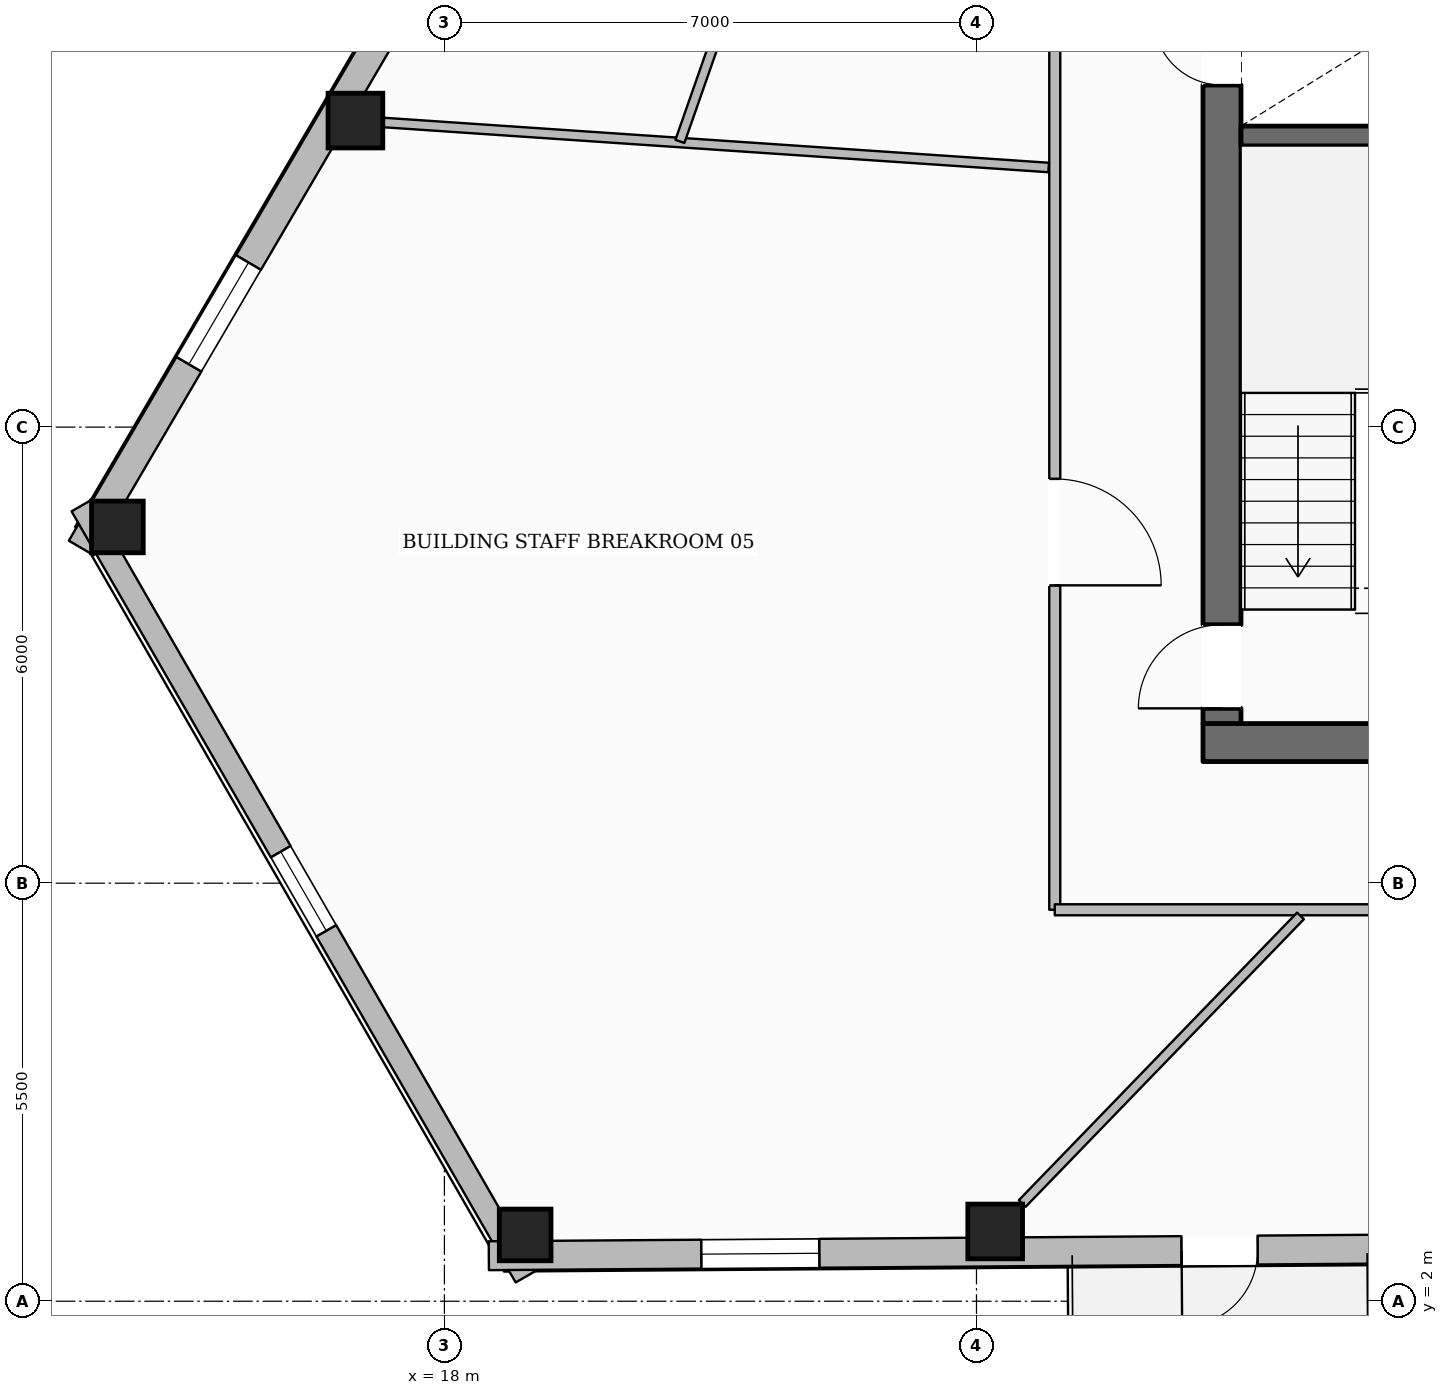
"""IFC4 building model, lengths in metres.
Left out: names, types, materials, properties, quantities, classifications, styles, units other than length and angle.
Written with IfcOpenShell. Run it as: python <this file> out.ifc"""

import sys

from ifc_helpers import new_model, si_unit, direction, frame, frame_2d, origin, origin_2d, place, context, subcontext, project, spatial, rectangle, hollow_rectangle, extrude, element, fill, save


model = new_model("IFC4")
c1 = context("Model", 3, precision=1e-05, world=origin(), true_north=direction((0.0, 1.0)))
c2 = subcontext(c1, "Body", "Model", "MODEL_VIEW")
j1 = project(units=[si_unit("LENGTHUNIT", "METRE"), si_unit("PLANEANGLEUNIT", "RADIAN")], contexts=[c1])
p1 = place(None, origin())
s1 = spatial("IfcSite", under=j1, at=p1, CompositionType="ELEMENT")
p2 = place(p1, origin())
s2 = spatial("IfcBuilding", under=s1, at=p2, CompositionType="ELEMENT")
p3 = place(p2, frame((0.0, 0.0, 143.25)))
s3 = spatial("IfcBuildingStorey", under=s2, at=p3, CompositionType="ELEMENT", Elevation=143.25)
p4 = place(p3, frame((27.98, 9.35, 0.0), z_axis=(0.0, 0.0, 1.0), x_axis=(1.0, 0.0, 0.0)))
e1 = element("IfcWall", 1, at=p4, inside=s3, PredefinedType="SOLIDWALL", context=c2, shape_type="SweptSolid", body=[
    extrude(rectangle(XDim=20.04, YDim=0.5, at=frame_2d((10.02, 0.0))), origin(), (0.0, 0.0, 1.0), 3.6),
])
p5 = place(p4, frame((10.52, 0.0, 0.0)))
e2 = element("IfcOpeningElement", 2, at=p5, cuts=e1, PredefinedType="OPENING", context=c2, shape_type="SweptSolid", body=[
    extrude(rectangle(XDim=1.4, YDim=2.2, at=frame_2d((0.7, 1.1))), frame((0.0, 0.26, 0.0), z_axis=(0.0, -1.0, 0.0), x_axis=(1.0, 0.0, 0.0)), (0.0, 0.0, 1.0), 0.52),
])
p6 = place(p3, frame((28.23, 9.6, 0.0), z_axis=(0.0, 0.0, 1.0), x_axis=(0.0, 1.0, 0.0)))
e3 = element("IfcWall", 3, at=p6, inside=s3, PredefinedType="SOLIDWALL", context=c2, shape_type="SweptSolid", body=[
    extrude(rectangle(XDim=13.0, YDim=0.5, at=frame_2d((6.5, 0.0))), origin(), (0.0, 0.0, 1.0), 3.6),
])
p7 = place(p6, frame((0.2, 0.0, 0.0)))
e4 = element("IfcOpeningElement", 4, at=p7, cuts=e3, PredefinedType="OPENING", context=c2, shape_type="SweptSolid", body=[
    extrude(rectangle(XDim=1.1, YDim=2.15, at=frame_2d((0.55, 1.075))), frame((0.0, 0.26, 0.0), z_axis=(0.0, -1.0, 0.0), x_axis=(1.0, 0.0, 0.0)), (0.0, 0.0, 1.0), 0.52),
])
p8 = place(p6, frame((8.4, 0.0, 0.0)))
e5 = element("IfcOpeningElement", 5, at=p8, cuts=e3, PredefinedType="OPENING", context=c2, shape_type="SweptSolid", body=[
    extrude(rectangle(XDim=0.9, YDim=2.1, at=frame_2d((0.45, 1.05))), frame((0.0, 0.26, 0.0), z_axis=(0.0, -1.0, 0.0), x_axis=(1.0, 0.0, 0.0)), (0.0, 0.0, 1.0), 0.52),
])
p9 = place(p3, frame((28.48, 17.33, 0.0), z_axis=(0.0, 0.0, 1.0), x_axis=(1.0, 0.0, 0.0)))
e6 = element("IfcWall", 6, at=p9, inside=s3, PredefinedType="SHEAR", context=c2, shape_type="SweptSolid", body=[
    extrude(rectangle(XDim=3.2, YDim=0.26, at=frame_2d((1.6, 0.0))), origin(), (0.0, 0.0, 1.0), 3.6),
])
p10 = place(p3, frame((16.829, 17.533, 0.0), z_axis=(0.0, 0.0, 1.0), x_axis=(1.0, 0.0, 0.0)))
e7 = element("IfcColumn", 7, at=p10, inside=s3, PredefinedType="COLUMN", context=c2, shape_type="SweptSolid", body=[
    extrude(hollow_rectangle(XDim=0.72, YDim=0.72, WallThickness=0.032, at=origin_2d()), origin(), (0.0, 0.0, 1.0), 3.6),
])
for number, where, z_axis, x_axis in (
    (8, (13.698, 12.187, 0.0), (0.0, 0.0, 1.0), (1.0, 0.0, 0.0)),
    (9, (19.062, 2.873, 0.0), (0.0, 0.0, 1.0), (1.0, 0.0, 0.0)),
):
    element("IfcColumn", number, at=place(p3, frame(where, z_axis=z_axis, x_axis=x_axis)), inside=s3, PredefinedType="COLUMN", context=c2, shape_type="SweptSolid", body=[
        extrude(hollow_rectangle(XDim=0.68, YDim=0.68, WallThickness=0.03, at=origin_2d()), origin(), (0.0, 0.0, 1.0), 3.6),
    ])
p11 = place(p3, frame((25.246, 2.918, 0.0), z_axis=(0.0, 0.0, 1.0), x_axis=(1.0, 0.0, 0.0)))
e10 = element("IfcColumn", 10, at=p11, inside=s3, PredefinedType="COLUMN", context=c2, shape_type="SweptSolid", body=[
    extrude(hollow_rectangle(XDim=0.72, YDim=0.72, WallThickness=0.032, at=origin_2d()), origin(), (0.0, 0.0, 1.0), 3.6),
])
p12 = place(p3, frame((13.223, 11.91, 0.0), z_axis=(0.0, 0.0, 1.0), x_axis=(0.505453242286, 0.86285399684, 0.0)))
e11 = element("IfcWall", 11, at=p12, inside=s3, PredefinedType="STANDARD", context=c2, shape_type="SweptSolid", body=[
    extrude(rectangle(XDim=38.125, YDim=0.38, at=frame_2d((19.062, 0.0))), origin(), (0.0, 0.0, 1.0), 3.059),
])
p13 = place(p12, frame((27.994, 0.0, 0.0)))
e12 = element("IfcOpeningElement", 12, at=p13, cuts=e11, PredefinedType="OPENING", context=c2, shape_type="SweptSolid", body=[
    extrude(rectangle(XDim=1.0, YDim=2.2, at=frame_2d((0.5, 1.1))), frame((0.0, 0.2, 0.0), z_axis=(0.0, -1.0, 0.0), x_axis=(1.0, 0.0, 0.0)), (0.0, 0.0, 1.0), 0.4),
])
p14 = place(p12, frame((33.78, 0.0, 0.65)))
e13 = element("IfcOpeningElement", 13, at=p14, cuts=e11, PredefinedType="OPENING", context=c2, shape_type="SweptSolid", body=[
    extrude(rectangle(XDim=1.55, YDim=1.75, at=frame_2d((0.775, 0.875))), frame((0.0, 0.2, 0.0), z_axis=(0.0, -1.0, 0.0), x_axis=(1.0, 0.0, 0.0)), (0.0, 0.0, 1.0), 0.4),
])
p15 = place(p12, frame((21.388, 0.0, 0.65)))
e14 = element("IfcOpeningElement", 14, at=p15, cuts=e11, PredefinedType="OPENING", context=c2, shape_type="SweptSolid", body=[
    extrude(rectangle(XDim=1.55, YDim=1.75, at=frame_2d((0.775, 0.875))), frame((0.0, 0.2, 0.0), z_axis=(0.0, -1.0, 0.0), x_axis=(1.0, 0.0, 0.0)), (0.0, 0.0, 1.0), 0.4),
])
p16 = place(p12, frame((8.997, 0.0, 0.65)))
e15 = element("IfcOpeningElement", 15, at=p16, cuts=e11, PredefinedType="OPENING", context=c2, shape_type="SweptSolid", body=[
    extrude(rectangle(XDim=1.55, YDim=1.75, at=frame_2d((0.775, 0.875))), frame((0.0, 0.2, 0.0), z_axis=(0.0, -1.0, 0.0), x_axis=(1.0, 0.0, 0.0)), (0.0, 0.0, 1.0), 0.4),
])
p17 = place(p12, frame((2.802, 0.0, 0.65)))
e16 = element("IfcOpeningElement", 16, at=p17, cuts=e11, PredefinedType="OPENING", context=c2, shape_type="SweptSolid", body=[
    extrude(rectangle(XDim=1.55, YDim=1.75, at=frame_2d((0.775, 0.875))), frame((0.0, 0.2, 0.0), z_axis=(0.0, -1.0, 0.0), x_axis=(1.0, 0.0, 0.0)), (0.0, 0.0, 1.0), 0.4),
])
p18 = place(p3, frame((19.068, 2.322, 0.0), z_axis=(0.0, 0.0, 1.0), x_axis=(-0.499082618799, 0.866554406609, 0.0)))
e17 = element("IfcWall", 17, at=p18, inside=s3, PredefinedType="STANDARD", context=c2, shape_type="SweptSolid", body=[
    extrude(rectangle(XDim=11.707, YDim=0.3, at=frame_2d((5.854, 0.0))), origin(), (0.0, 0.0, 1.0), 3.059),
])
p19 = place(p18, frame((5.253, 0.0, 0.65)))
e18 = element("IfcOpeningElement", 18, at=p19, cuts=e17, PredefinedType="OPENING", context=c2, shape_type="SweptSolid", body=[
    extrude(rectangle(XDim=1.2, YDim=1.7, at=frame_2d((0.6, 0.85))), frame((0.0, 0.16, 0.0), z_axis=(0.0, -1.0, 0.0), x_axis=(1.0, 0.0, 0.0)), (0.0, 0.0, 1.0), 0.32),
])
p20 = place(p3, frame((56.641, 2.879, 0.0), z_axis=(0.0, 0.0, 1.0), x_axis=(-0.99997292902, -0.007358072284, 0.0)))
e19 = element("IfcWall", 19, at=p20, inside=s3, PredefinedType="STANDARD", context=c2, shape_type="SweptSolid", body=[
    extrude(rectangle(XDim=38.057, YDim=0.38, at=frame_2d((19.029, 0.0))), origin(), (0.0, 0.0, 1.0), 3.059),
])
p21 = place(p20, frame((27.943, 0.0, 0.0)))
e20 = element("IfcOpeningElement", 20, at=p21, cuts=e19, PredefinedType="OPENING", context=c2, shape_type="SweptSolid", body=[
    extrude(rectangle(XDim=1.0, YDim=2.2, at=frame_2d((0.5, 1.1))), frame((0.0, 0.2, 0.0), z_axis=(0.0, -1.0, 0.0), x_axis=(1.0, 0.0, 0.0)), (0.0, 0.0, 1.0), 0.4),
])
p22 = place(p20, frame((33.711, 0.0, 0.65)))
e21 = element("IfcOpeningElement", 21, at=p22, cuts=e19, PredefinedType="OPENING", context=c2, shape_type="SweptSolid", body=[
    extrude(rectangle(XDim=1.55, YDim=1.75, at=frame_2d((0.775, 0.875))), frame((0.0, 0.2, 0.0), z_axis=(0.0, -1.0, 0.0), x_axis=(1.0, 0.0, 0.0)), (0.0, 0.0, 1.0), 0.4),
])
p23 = place(p20, frame((21.342, 0.0, 0.65)))
e22 = element("IfcOpeningElement", 22, at=p23, cuts=e19, PredefinedType="OPENING", context=c2, shape_type="SweptSolid", body=[
    extrude(rectangle(XDim=1.55, YDim=1.75, at=frame_2d((0.775, 0.875))), frame((0.0, 0.2, 0.0), z_axis=(0.0, -1.0, 0.0), x_axis=(1.0, 0.0, 0.0)), (0.0, 0.0, 1.0), 0.4),
])
p24 = place(p20, frame((8.974, 0.0, 0.65)))
e23 = element("IfcOpeningElement", 23, at=p24, cuts=e19, PredefinedType="OPENING", context=c2, shape_type="SweptSolid", body=[
    extrude(rectangle(XDim=1.55, YDim=1.75, at=frame_2d((0.775, 0.875))), frame((0.0, 0.2, 0.0), z_axis=(0.0, -1.0, 0.0), x_axis=(1.0, 0.0, 0.0)), (0.0, 0.0, 1.0), 0.4),
])
p25 = place(p20, frame((2.79, 0.0, 0.65)))
e24 = element("IfcOpeningElement", 24, at=p25, cuts=e19, PredefinedType="OPENING", context=c2, shape_type="SweptSolid", body=[
    extrude(rectangle(XDim=1.55, YDim=1.75, at=frame_2d((0.775, 0.875))), frame((0.0, 0.2, 0.0), z_axis=(0.0, -1.0, 0.0), x_axis=(1.0, 0.0, 0.0)), (0.0, 0.0, 1.0), 0.4),
])
p26 = place(p3, frame((26.03, 25.05, 0.0), z_axis=(0.0, 0.0, 1.0), x_axis=(0.0, -1.0, 0.0)))
e25 = element("IfcWall", 25, at=p26, inside=s3, PredefinedType="PARTITIONING", context=c2, shape_type="SweptSolid", body=[
    extrude(rectangle(XDim=17.9, YDim=0.145, at=frame_2d((8.95, 0.0))), origin(), (0.0, 0.0, 1.0), 3.288),
])
p27 = place(p26, frame((3.663, 0.0, 0.0)))
e26 = element("IfcOpeningElement", 26, at=p27, cuts=e25, PredefinedType="OPENING", context=c2, shape_type="SweptSolid", body=[
    extrude(rectangle(XDim=0.98, YDim=2.15, at=frame_2d((0.49, 1.075))), frame((0.0, 0.083, 0.0), z_axis=(0.0, -1.0, 0.0), x_axis=(1.0, 0.0, 0.0)), (0.0, 0.0, 1.0), 0.165),
])
p28 = place(p26, frame((12.232, 0.0, 0.0)))
e27 = element("IfcOpeningElement", 27, at=p28, cuts=e25, PredefinedType="OPENING", context=c2, shape_type="SweptSolid", body=[
    extrude(rectangle(XDim=1.4, YDim=2.2, at=frame_2d((0.7, 1.1))), frame((0.0, 0.083, 0.0), z_axis=(0.0, -1.0, 0.0), x_axis=(1.0, 0.0, 0.0)), (0.0, 0.0, 1.0), 0.165),
])
p29 = place(p3, frame((26.03, 7.15, 0.0), z_axis=(0.0, 0.0, 1.0), x_axis=(1.0, 0.0, 0.0)))
e28 = element("IfcWall", 28, at=p29, inside=s3, PredefinedType="PARTITIONING", context=c2, shape_type="SweptSolid", body=[
    extrude(rectangle(XDim=23.94, YDim=0.145, at=frame_2d((11.97, 0.0))), origin(), (0.0, 0.0, 1.0), 3.6),
])
p30 = place(p29, frame((11.065, 0.0, 0.0)))
e29 = element("IfcOpeningElement", 29, at=p30, cuts=e28, PredefinedType="OPENING", context=c2, shape_type="SweptSolid", body=[
    extrude(rectangle(XDim=1.4, YDim=2.2, at=frame_2d((0.7, 1.1))), frame((0.0, 0.083, 0.0), z_axis=(0.0, -1.0, 0.0), x_axis=(1.0, 0.0, 0.0)), (0.0, 0.0, 1.0), 0.165),
])
p31 = place(p3, frame((25.949, 16.916, 0.0), z_axis=(0.0, 0.0, 1.0), x_axis=(-0.997717908237, 0.067520186492, 0.0)))
e30 = element("IfcWall", 30, at=p31, inside=s3, PredefinedType="PARTITIONING", context=c2, shape_type="SweptSolid", body=[
    extrude(rectangle(XDim=8.772, YDim=0.125, at=frame_2d((4.386, 0.0))), origin(), (0.0, 0.0, 1.0), 3.141),
])
p32 = place(p3, frame((29.263, 7.07, 0.0), z_axis=(0.0, 0.0, 1.0), x_axis=(-0.695300134942, -0.718719501857, 0.0)))
e31 = element("IfcWall", 31, at=p32, inside=s3, PredefinedType="PARTITIONING", context=c2, shape_type="SweptSolid", body=[
    extrude(rectangle(XDim=5.264, YDim=0.125, at=frame_2d((2.632, 0.0))), origin(), (0.0, 0.0, 1.0), 3.6),
])
p33 = place(p3, frame((24.522, 27.042, 0.0), z_axis=(0.0, 0.0, 1.0), x_axis=(-0.330346228004, -0.943859825209, 0.0)))
e32 = element("IfcWall", 32, at=p33, inside=s3, PredefinedType="PARTITIONING", context=c2, shape_type="SweptSolid", body=[
    extrude(rectangle(XDim=10.365, YDim=0.125, at=frame_2d((5.183, 0.0))), origin(), (0.0, 0.0, 1.0), 3.288),
])
p34 = place(p33, frame((4.695, 0.0, 0.0)))
e33 = element("IfcOpeningElement", 33, at=p34, cuts=e32, PredefinedType="OPENING", context=c2, shape_type="SweptSolid", body=[
    extrude(rectangle(XDim=0.98, YDim=2.15, at=frame_2d((0.49, 1.075))), frame((0.0, 0.073, 0.0), z_axis=(0.0, -1.0, 0.0), x_axis=(1.0, 0.0, 0.0)), (0.0, 0.0, 1.0), 0.145),
])
p35 = place(p21, origin())
e34 = element("IfcDoor", 34, at=p35, inside=s3, OperationType="SINGLE_SWING_RIGHT", PredefinedType="DOOR", context=c2, shape_type="SweptSolid", body=[
    extrude(rectangle(XDim=1.0, YDim=2.2, at=frame_2d((0.5, 1.1))), frame((0.0, 0.025, 0.0), z_axis=(0.0, -1.0, 0.0), x_axis=(1.0, 0.0, 0.0)), (0.0, 0.0, 1.0), 0.05),
])
fill(e20, e34)
p36 = place(p17, origin())
e35 = element("IfcWindow", 35, at=p36, inside=s3, PartitioningType="SINGLE_PANEL", PredefinedType="WINDOW", context=c2, shape_type="SweptSolid", body=[
    extrude(rectangle(XDim=1.55, YDim=1.75, at=frame_2d((0.775, 0.875))), frame((0.0, 0.03, 0.0), z_axis=(0.0, -1.0, 0.0), x_axis=(1.0, 0.0, 0.0)), (0.0, 0.0, 1.0), 0.06),
])
fill(e16, e35)
p37 = place(p22, origin())
e36 = element("IfcWindow", 36, at=p37, inside=s3, PartitioningType="SINGLE_PANEL", PredefinedType="WINDOW", context=c2, shape_type="SweptSolid", body=[
    extrude(rectangle(XDim=1.55, YDim=1.75, at=frame_2d((0.775, 0.875))), frame((0.0, 0.03, 0.0), z_axis=(0.0, -1.0, 0.0), x_axis=(1.0, 0.0, 0.0)), (0.0, 0.0, 1.0), 0.06),
])
fill(e21, e36)
p38 = place(p19, origin())
e37 = element("IfcWindow", 37, at=p38, inside=s3, PartitioningType="SINGLE_PANEL", PredefinedType="WINDOW", context=c2, shape_type="SweptSolid", body=[
    extrude(rectangle(XDim=1.2, YDim=1.7, at=frame_2d((0.6, 0.85))), frame((0.0, 0.03, 0.0), z_axis=(0.0, -1.0, 0.0), x_axis=(1.0, 0.0, 0.0)), (0.0, 0.0, 1.0), 0.06),
])
fill(e18, e37)
p39 = place(p7, origin())
e38 = element("IfcDoor", 38, at=p39, inside=s3, OperationType="SINGLE_SWING_LEFT", PredefinedType="DOOR", context=c2, shape_type="SweptSolid", body=[
    extrude(rectangle(XDim=1.1, YDim=2.15, at=frame_2d((0.55, 1.075))), frame((0.0, 0.025, 0.0), z_axis=(0.0, -1.0, 0.0), x_axis=(1.0, 0.0, 0.0)), (0.0, 0.0, 1.0), 0.05),
])
fill(e4, e38)
p40 = place(p8, origin())
e39 = element("IfcDoor", 39, at=p40, inside=s3, OperationType="SINGLE_SWING_RIGHT", PredefinedType="DOOR", context=c2, shape_type="SweptSolid", body=[
    extrude(rectangle(XDim=0.9, YDim=2.1, at=frame_2d((0.45, 1.05))), frame((0.0, 0.025, 0.0), z_axis=(0.0, -1.0, 0.0), x_axis=(1.0, 0.0, 0.0)), (0.0, 0.0, 1.0), 0.05),
])
fill(e5, e39)
p41 = place(p28, origin())
e40 = element("IfcDoor", 40, at=p41, inside=s3, OperationType="SINGLE_SWING_RIGHT", PredefinedType="DOOR", context=c2, shape_type="SweptSolid", body=[
    extrude(rectangle(XDim=1.4, YDim=2.2, at=frame_2d((0.7, 1.1))), frame((0.0, 0.025, 0.0), z_axis=(0.0, -1.0, 0.0), x_axis=(1.0, 0.0, 0.0)), (0.0, 0.0, 1.0), 0.05),
])
fill(e27, e40)
save(model, sys.argv[1])
